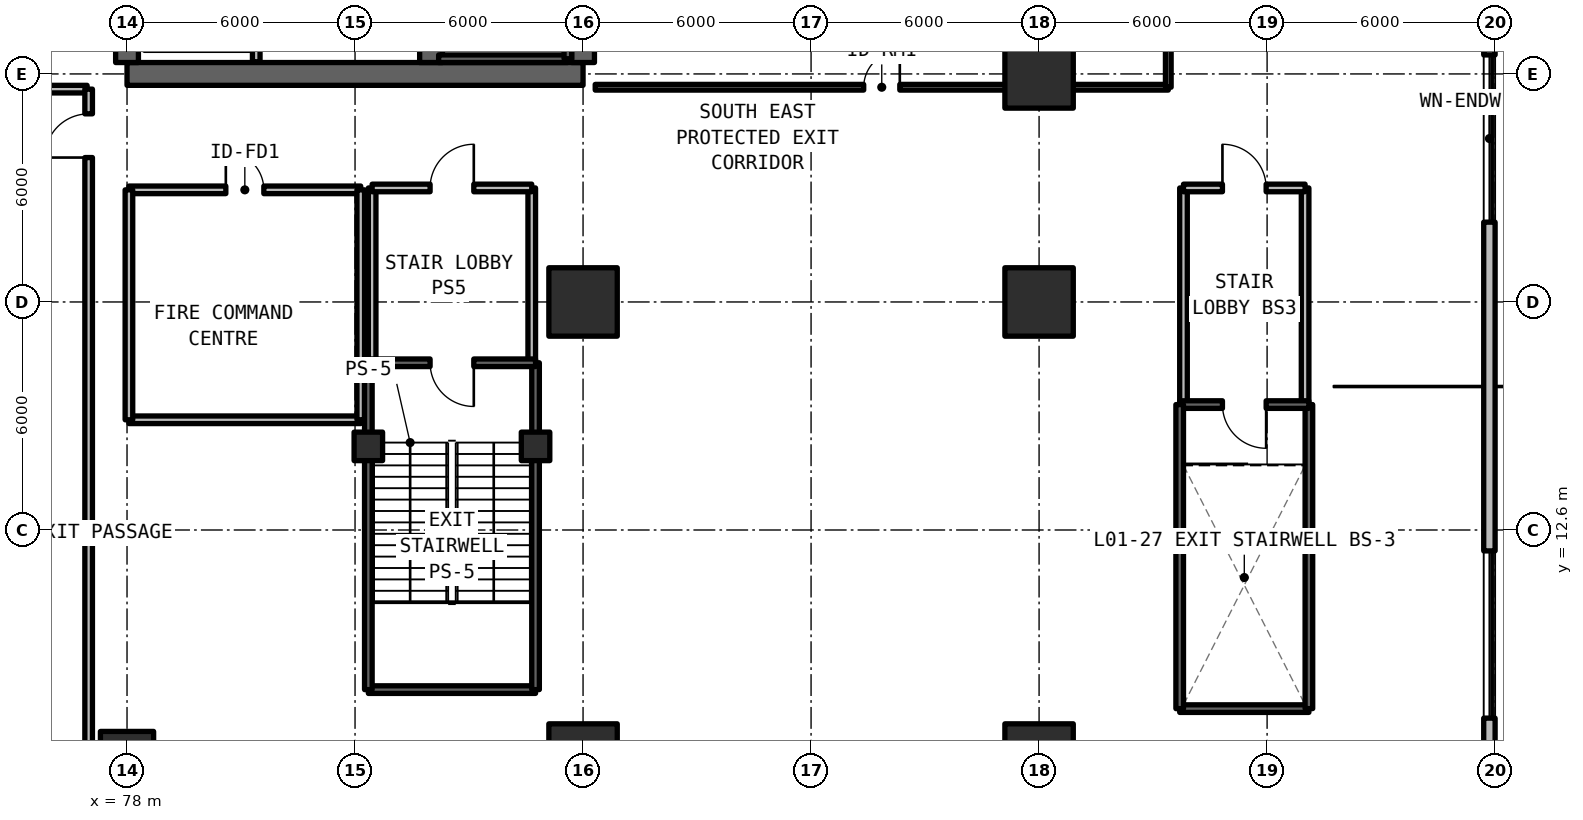
"""IFC4 building model, lengths in metres.
Left out: names, types, materials, properties, quantities, classifications, styles, units other than length and angle.
Written with IfcOpenShell. Run it as: python <this file> out.ifc"""

import sys

from ifc_helpers import new_model, si_unit, direction, frame, frame_2d, origin, origin_2d, place, context, subcontext, project, spatial, rectangle, circle, extrude, element, fill, save


model = new_model("IFC4")
c1 = context("Model", 3, precision=1e-05, world=origin(), true_north=direction((0.0, 1.0)))
c2 = subcontext(c1, "Body", "Model", "MODEL_VIEW")
j1 = project(units=[si_unit("LENGTHUNIT", "METRE"), si_unit("PLANEANGLEUNIT", "RADIAN")], contexts=[c1])
p1 = place(None, origin())
s1 = spatial("IfcSite", under=j1, at=p1, CompositionType="ELEMENT")
p2 = place(p1, origin())
s2 = spatial("IfcBuilding", under=s1, at=p2, CompositionType="ELEMENT")
p3 = place(p2, origin())
s3 = spatial("IfcBuildingStorey", under=s2, at=p3, CompositionType="ELEMENT", Elevation=0.0)
p4 = place(p3, frame((78.0, 24.6, 0.0), z_axis=(0.0, 0.0, 1.0), x_axis=(1.0, 0.0, 0.0)))
e1 = element("IfcWall", 1, at=p4, inside=s3, PredefinedType="SHEAR", context=c2, shape_type="SweptSolid", body=[
    extrude(rectangle(XDim=12.0, YDim=0.6, at=frame_2d((6.0, 0.0))), origin(), (0.0, 0.0, 1.0), 4.95),
])
p5 = place(p3, frame((90.0, 24.9, 0.0), z_axis=(0.0, 0.0, 1.0), x_axis=(0.0, 1.0, 0.0)))
e2 = element("IfcWall", 2, at=p5, inside=s3, PredefinedType="SHEAR", context=c2, shape_type="SweptSolid", body=[
    extrude(rectangle(XDim=17.4, YDim=0.6, at=frame_2d((8.7, 0.0))), origin(), (0.0, 0.0, 1.0), 4.95),
])
p6 = place(p3, frame((78.0, 24.9, 0.0), z_axis=(0.0, 0.0, 1.0), x_axis=(0.0, 1.0, 0.0)))
e3 = element("IfcWall", 3, at=p6, inside=s3, PredefinedType="SHEAR", context=c2, shape_type="SweptSolid", body=[
    extrude(rectangle(XDim=8.9, YDim=0.6, at=frame_2d((4.45, 0.0))), origin(), (0.0, 0.0, 1.0), 4.95),
])
p7 = place(p3, frame((86.0, 24.9, 0.0), z_axis=(0.0, 0.0, 1.0), x_axis=(0.0, 1.0, 0.0)))
e4 = element("IfcWall", 4, at=p7, inside=s3, PredefinedType="SHEAR", context=c2, shape_type="SweptSolid", body=[
    extrude(rectangle(XDim=17.4, YDim=0.6, at=frame_2d((8.7, 0.0))), origin(), (0.0, 0.0, 1.0), 4.95),
])
p8 = place(p7, frame((0.35, 0.0, 0.0)))
e5 = element("IfcOpeningElement", 5, at=p8, cuts=e4, PredefinedType="OPENING", context=c2, shape_type="SweptSolid", body=[
    extrude(rectangle(XDim=1.15, YDim=2.15, at=frame_2d((0.575, 1.075))), frame((0.0, 0.31, 0.0), z_axis=(0.0, -1.0, 0.0), x_axis=(1.0, 0.0, 0.0)), (0.0, 0.0, 1.0), 0.62),
])
p9 = place(p7, frame((9.55, 0.0, 0.0)))
e6 = element("IfcOpeningElement", 6, at=p9, cuts=e4, PredefinedType="OPENING", context=c2, shape_type="SweptSolid", body=[
    extrude(rectangle(XDim=1.15, YDim=2.15, at=frame_2d((0.575, 1.075))), frame((0.0, 0.31, 0.0), z_axis=(0.0, -1.0, 0.0), x_axis=(1.0, 0.0, 0.0)), (0.0, 0.0, 1.0), 0.62),
])
p10 = place(p3, frame((78.0, 6.6, 0.0), z_axis=(0.0, 0.0, 1.0), x_axis=(1.0, 0.0, 0.0)))
e7 = element("IfcColumn", 7, at=p10, inside=s3, PredefinedType="COLUMN", context=c2, shape_type="SweptSolid", body=[
    extrude(circle(Radius=0.7, at=origin_2d()), origin(), (0.0, 0.0, 1.0), 4.95),
])
for number, where, z_axis, x_axis in (
    (8, (90.0, 6.6, 0.0), (0.0, 0.0, 1.0), (1.0, 0.0, 0.0)),
    (9, (102.0, 6.6, 0.0), (0.0, 0.0, 1.0), (1.0, 0.0, 0.0)),
    (10, (102.0, 24.6, 0.0), (0.0, 0.0, 1.0), (1.0, 0.0, 0.0)),
    (11, (90.0, 18.6, 0.0), (0.0, 0.0, 1.0), (1.0, 0.0, 0.0)),
    (12, (102.0, 18.6, 0.0), (0.0, 0.0, 1.0), (1.0, 0.0, 0.0)),
):
    element("IfcColumn", number, at=place(p3, frame(where, z_axis=z_axis, x_axis=x_axis)), inside=s3, PredefinedType="COLUMN", context=c2, shape_type="SweptSolid", body=[
        extrude(rectangle(XDim=1.8, YDim=1.8, at=origin_2d()), origin(), (0.0, 0.0, 1.0), 4.95),
    ])
for number, where, z_axis, x_axis in (
    (13, (84.35, 14.8, 0.0), (0.0, 0.0, 1.0), (1.0, 0.0, 0.0)),
    (14, (88.75, 14.8, 0.0), (0.0, 0.0, 1.0), (1.0, 0.0, 0.0)),
):
    element("IfcColumn", number, at=place(p3, frame(where, z_axis=z_axis, x_axis=x_axis)), inside=s3, PredefinedType="COLUMN", context=c2, shape_type="SweptSolid", body=[
        extrude(rectangle(XDim=0.75, YDim=0.75, at=origin_2d()), origin(), (0.0, 0.0, 1.0), 4.95),
    ])
p11 = place(p3, frame((113.85, 0.15, 0.0), z_axis=(0.0, 0.0, 1.0), x_axis=(0.0, 1.0, 0.0)))
e15 = element("IfcWall", 15, at=p11, inside=s3, PredefinedType="SOLIDWALL", context=c2, shape_type="SweptSolid", body=[
    extrude(rectangle(XDim=66.9, YDim=0.3, at=frame_2d((33.45, 0.0))), origin(), (0.0, 0.0, 1.0), 4.67),
])
p12 = place(p11, frame((20.55, 0.0, 0.78)))
e16 = element("IfcOpeningElement", 16, at=p12, cuts=e15, PredefinedType="OPENING", context=c2, shape_type="SweptSolid", body=[
    extrude(rectangle(XDim=4.4, YDim=1.66, at=frame_2d((2.2, 0.83))), frame((0.0, 0.16, 0.0), z_axis=(0.0, -1.0, 0.0), x_axis=(1.0, 0.0, 0.0)), (0.0, 0.0, 1.0), 0.32),
])
p13 = place(p11, frame((41.95, 0.0, 0.78)))
e17 = element("IfcOpeningElement", 17, at=p13, cuts=e15, PredefinedType="OPENING", context=c2, shape_type="SweptSolid", body=[
    extrude(rectangle(XDim=4.4, YDim=1.66, at=frame_2d((2.2, 0.83))), frame((0.0, 0.16, 0.0), z_axis=(0.0, -1.0, 0.0), x_axis=(1.0, 0.0, 0.0)), (0.0, 0.0, 1.0), 0.32),
])
p14 = place(p11, frame((7.5, 0.0, 0.78)))
e18 = element("IfcOpeningElement", 18, at=p14, cuts=e15, PredefinedType="OPENING", context=c2, shape_type="SweptSolid", body=[
    extrude(rectangle(XDim=4.4, YDim=1.66, at=frame_2d((2.2, 0.83))), frame((0.0, 0.16, 0.0), z_axis=(0.0, -1.0, 0.0), x_axis=(1.0, 0.0, 0.0)), (0.0, 0.0, 1.0), 0.32),
])
p15 = place(p11, frame((26.5, 0.0, 0.78)))
e19 = element("IfcOpeningElement", 19, at=p15, cuts=e15, PredefinedType="OPENING", context=c2, shape_type="SweptSolid", body=[
    extrude(rectangle(XDim=4.4, YDim=1.66, at=frame_2d((2.2, 0.83))), frame((0.0, 0.16, 0.0), z_axis=(0.0, -1.0, 0.0), x_axis=(1.0, 0.0, 0.0)), (0.0, 0.0, 1.0), 0.32),
])
p16 = place(p11, frame((36.0, 0.0, 0.78)))
e20 = element("IfcOpeningElement", 20, at=p16, cuts=e15, PredefinedType="OPENING", context=c2, shape_type="SweptSolid", body=[
    extrude(rectangle(XDim=4.4, YDim=1.66, at=frame_2d((2.2, 0.83))), frame((0.0, 0.16, 0.0), z_axis=(0.0, -1.0, 0.0), x_axis=(1.0, 0.0, 0.0)), (0.0, 0.0, 1.0), 0.32),
])
p17 = place(p11, frame((55.0, 0.0, 0.78)))
e21 = element("IfcOpeningElement", 21, at=p17, cuts=e15, PredefinedType="OPENING", context=c2, shape_type="SweptSolid", body=[
    extrude(rectangle(XDim=4.4, YDim=1.66, at=frame_2d((2.2, 0.83))), frame((0.0, 0.16, 0.0), z_axis=(0.0, -1.0, 0.0), x_axis=(1.0, 0.0, 0.0)), (0.0, 0.0, 1.0), 0.32),
])
p18 = place(p3, frame((81.4, 24.92, 0.0), z_axis=(0.0, 0.0, 1.0), x_axis=(0.0, 1.0, 0.0)))
e22 = element("IfcWall", 22, at=p18, inside=s3, PredefinedType="SOLIDWALL", context=c2, shape_type="SweptSolid", body=[
    extrude(rectangle(XDim=3.58, YDim=0.2, at=frame_2d((1.79, 0.0))), origin(), (0.0, 0.0, 1.0), 3.89),
])
p19 = place(p18, frame((1.3, 0.0, 0.0)))
e23 = element("IfcOpeningElement", 23, at=p19, cuts=e22, PredefinedType="OPENING", context=c2, shape_type="SweptSolid", body=[
    extrude(rectangle(XDim=1.1, YDim=2.2, at=frame_2d((0.55, 1.1))), frame((0.0, 0.11, 0.0), z_axis=(0.0, -1.0, 0.0), x_axis=(1.0, 0.0, 0.0)), (0.0, 0.0, 1.0), 0.22),
])
p20 = place(p3, frame((74.1, 24.2, 0.0), z_axis=(0.0, 0.0, 1.0), x_axis=(1.0, 0.0, 0.0)))
e24 = element("IfcWall", 24, at=p20, inside=s3, PredefinedType="SOLIDWALL", context=c2, shape_type="SweptSolid", body=[
    extrude(rectangle(XDim=2.85, YDim=0.2, at=frame_2d((1.425, 0.0))), origin(), (0.0, 0.0, 1.0), 3.89),
])
p21 = place(p20, frame((0.65, 0.0, 0.0)))
e25 = element("IfcOpeningElement", 25, at=p21, cuts=e24, PredefinedType="OPENING", context=c2, shape_type="SweptSolid", body=[
    extrude(rectangle(XDim=1.15, YDim=2.15, at=frame_2d((0.575, 1.075))), frame((0.0, 0.11, 0.0), z_axis=(0.0, -1.0, 0.0), x_axis=(1.0, 0.0, 0.0)), (0.0, 0.0, 1.0), 0.22),
])
for number, where, z_axis, x_axis in (
    (26, (84.45, 17.0, 0.0), (0.0, 0.0, 1.0), (0.0, 1.0, 0.0)),
    (27, (88.65, 17.0, 0.0), (0.0, 0.0, 1.0), (0.0, 1.0, 0.0)),
):
    element("IfcWall", number, at=place(p3, frame(where, z_axis=z_axis, x_axis=x_axis)), inside=s3, PredefinedType="SOLIDWALL", context=c2, shape_type="SweptSolid", body=[
        extrude(rectangle(XDim=4.6, YDim=0.2, at=frame_2d((2.3, 0.0))), origin(), (0.0, 0.0, 1.0), 3.89),
    ])
p22 = place(p3, frame((84.45, 21.6, 0.0), z_axis=(0.0, 0.0, 1.0), x_axis=(1.0, 0.0, 0.0)))
e28 = element("IfcWall", 28, at=p22, inside=s3, PredefinedType="SOLIDWALL", context=c2, shape_type="SweptSolid", body=[
    extrude(rectangle(XDim=4.2, YDim=0.2, at=frame_2d((2.1, 0.0))), origin(), (0.0, 0.0, 1.0), 3.89),
])
p23 = place(p22, frame((1.525, 0.0, 0.0)))
e29 = element("IfcOpeningElement", 29, at=p23, cuts=e28, PredefinedType="OPENING", context=c2, shape_type="SweptSolid", body=[
    extrude(rectangle(XDim=1.15, YDim=2.15, at=frame_2d((0.575, 1.075))), frame((0.0, 0.11, 0.0), z_axis=(0.0, -1.0, 0.0), x_axis=(1.0, 0.0, 0.0)), (0.0, 0.0, 1.0), 0.22),
])
for number, where, z_axis, x_axis in (
    (30, (105.8, 15.9, 0.0), (0.0, 0.0, 1.0), (0.0, 1.0, 0.0)),
    (31, (109.0, 15.9, 0.0), (0.0, 0.0, 1.0), (0.0, 1.0, 0.0)),
):
    element("IfcWall", number, at=place(p3, frame(where, z_axis=z_axis, x_axis=x_axis)), inside=s3, PredefinedType="SOLIDWALL", context=c2, shape_type="SweptSolid", body=[
        extrude(rectangle(XDim=5.7, YDim=0.2, at=frame_2d((2.85, 0.0))), origin(), (0.0, 0.0, 1.0), 3.89),
    ])
p24 = place(p3, frame((105.8, 21.6, 0.0), z_axis=(0.0, 0.0, 1.0), x_axis=(1.0, 0.0, 0.0)))
e32 = element("IfcWall", 32, at=p24, inside=s3, PredefinedType="SOLIDWALL", context=c2, shape_type="SweptSolid", body=[
    extrude(rectangle(XDim=3.2, YDim=0.2, at=frame_2d((1.6, 0.0))), origin(), (0.0, 0.0, 1.0), 3.89),
])
p25 = place(p24, frame((1.025, 0.0, 0.0)))
e33 = element("IfcOpeningElement", 33, at=p25, cuts=e32, PredefinedType="OPENING", context=c2, shape_type="SweptSolid", body=[
    extrude(rectangle(XDim=1.15, YDim=2.15, at=frame_2d((0.575, 1.075))), frame((0.0, 0.11, 0.0), z_axis=(0.0, -1.0, 0.0), x_axis=(1.0, 0.0, 0.0)), (0.0, 0.0, 1.0), 0.22),
])
p26 = place(p3, frame((76.99, 0.3, 0.0), z_axis=(0.0, 0.0, 1.0), x_axis=(0.0, 1.0, 0.0)))
e34 = element("IfcWall", 34, at=p26, inside=s3, PredefinedType="SOLIDWALL", context=c2, shape_type="SweptSolid", body=[
    extrude(rectangle(XDim=23.9, YDim=0.2, at=frame_2d((11.95, 0.0))), origin(), (0.0, 0.0, 1.0), 3.89),
])
p27 = place(p26, frame((22.1, 0.0, 0.0)))
e35 = element("IfcOpeningElement", 35, at=p27, cuts=e34, PredefinedType="OPENING", context=c2, shape_type="SweptSolid", body=[
    extrude(rectangle(XDim=1.15, YDim=2.15, at=frame_2d((0.575, 1.075))), frame((0.0, 0.11, 0.0), z_axis=(0.0, -1.0, 0.0), x_axis=(1.0, 0.0, 0.0)), (0.0, 0.0, 1.0), 0.22),
])
p28 = place(p3, frame((78.05, 15.5, 0.0), z_axis=(0.0, 0.0, 1.0), x_axis=(1.0, 0.0, 0.0)))
e36 = element("IfcWall", 36, at=p28, inside=s3, PredefinedType="SOLIDWALL", context=c2, shape_type="SweptSolid", body=[
    extrude(rectangle(XDim=6.1, YDim=0.2, at=frame_2d((3.05, 0.0))), origin(), (0.0, 0.0, 1.0), 3.89),
])
p29 = place(p3, frame((78.05, 21.55, 0.0), z_axis=(0.0, 0.0, 1.0), x_axis=(1.0, 0.0, 0.0)))
e37 = element("IfcWall", 37, at=p29, inside=s3, PredefinedType="SOLIDWALL", context=c2, shape_type="SweptSolid", body=[
    extrude(rectangle(XDim=6.1, YDim=0.2, at=frame_2d((3.05, 0.0))), origin(), (0.0, 0.0, 1.0), 3.89),
])
p30 = place(p29, frame((2.55, 0.0, 0.0)))
e38 = element("IfcOpeningElement", 38, at=p30, cuts=e37, PredefinedType="OPENING", context=c2, shape_type="SweptSolid", body=[
    extrude(rectangle(XDim=1.0, YDim=2.15, at=frame_2d((0.5, 1.075))), frame((0.0, 0.11, 0.0), z_axis=(0.0, -1.0, 0.0), x_axis=(1.0, 0.0, 0.0)), (0.0, 0.0, 1.0), 0.22),
])
p31 = place(p3, frame((78.05, 15.5, 0.0), z_axis=(0.0, 0.0, 1.0), x_axis=(0.0, 1.0, 0.0)))
e39 = element("IfcWall", 39, at=p31, inside=s3, PredefinedType="SOLIDWALL", context=c2, shape_type="SweptSolid", body=[
    extrude(rectangle(XDim=6.05, YDim=0.2, at=frame_2d((3.025, 0.0))), origin(), (0.0, 0.0, 1.0), 3.885),
])
p32 = place(p3, frame((84.15, 15.5, 0.0), z_axis=(0.0, 0.0, 1.0), x_axis=(0.0, 1.0, 0.0)))
e40 = element("IfcWall", 40, at=p32, inside=s3, PredefinedType="SOLIDWALL", context=c2, shape_type="SweptSolid", body=[
    extrude(rectangle(XDim=6.05, YDim=0.2, at=frame_2d((3.025, 0.0))), origin(), (0.0, 0.0, 1.0), 3.89),
])
p33 = place(p3, frame((90.32, 24.25, 0.0), z_axis=(0.0, 0.0, 1.0), x_axis=(1.0, 0.0, 0.0)))
e41 = element("IfcWall", 41, at=p33, inside=s3, PredefinedType="SOLIDWALL", context=c2, shape_type="SweptSolid", body=[
    extrude(rectangle(XDim=15.08, YDim=0.15, at=frame_2d((7.54, 0.0))), origin(), (0.0, 0.0, 1.0), 3.89),
])
p34 = place(p33, frame((7.065, 0.0, 0.0)))
e42 = element("IfcOpeningElement", 42, at=p34, cuts=e41, PredefinedType="OPENING", context=c2, shape_type="SweptSolid", body=[
    extrude(rectangle(XDim=0.95, YDim=2.15, at=frame_2d((0.475, 1.075))), frame((0.0, 0.085, 0.0), z_axis=(0.0, -1.0, 0.0), x_axis=(1.0, 0.0, 0.0)), (0.0, 0.0, 1.0), 0.17),
])
p35 = place(p3, frame((105.4, 24.25, 0.0), z_axis=(0.0, 0.0, 1.0), x_axis=(0.0, 1.0, 0.0)))
e43 = element("IfcWall", 43, at=p35, inside=s3, PredefinedType="SOLIDWALL", context=c2, shape_type="SweptSolid", body=[
    extrude(rectangle(XDim=18.7, YDim=0.15, at=frame_2d((9.35, 0.0))), origin(), (0.0, 0.0, 1.0), 3.89),
])
p36 = place(p3, frame((86.2, 25.0, 0.0), z_axis=(0.0, 0.0, 1.0), x_axis=(1.0, 0.0, 0.0)))
e44 = element("IfcWall", 44, at=p36, inside=s3, PredefinedType="SOLIDWALL", context=c2, shape_type="SweptSolid", body=[
    extrude(rectangle(XDim=3.4, YDim=0.2, at=frame_2d((1.7, 0.0))), origin(), (0.0, 0.0, 1.0), 4.95),
])
p37 = place(p3, frame((89.6, 25.0, 0.0), z_axis=(0.0, 0.0, 1.0), x_axis=(0.0, 1.0, 0.0)))
e45 = element("IfcWall", 45, at=p37, inside=s3, PredefinedType="SOLIDWALL", context=c2, shape_type="SweptSolid", body=[
    extrude(rectangle(XDim=8.0, YDim=0.2, at=frame_2d((4.0, 0.0))), origin(), (0.0, 0.0, 1.0), 4.95),
])
p38 = place(p3, frame((84.35, 8.4, 0.0), z_axis=(0.0, 0.0, 1.0), x_axis=(1.0, 0.0, 0.0)))
e46 = element("IfcWall", 46, at=p38, inside=s3, PredefinedType="SOLIDWALL", context=c2, shape_type="SweptSolid", body=[
    extrude(rectangle(XDim=4.4, YDim=0.2, at=frame_2d((2.2, 0.0))), origin(), (0.0, 0.0, 1.0), 4.95),
])
p39 = place(p3, frame((88.75, 8.4, 0.0), z_axis=(0.0, 0.0, 1.0), x_axis=(0.0, 1.0, 0.0)))
e47 = element("IfcWall", 47, at=p39, inside=s3, PredefinedType="SOLIDWALL", context=c2, shape_type="SweptSolid", body=[
    extrude(rectangle(XDim=8.6, YDim=0.2, at=frame_2d((4.3, 0.0))), origin(), (0.0, 0.0, 1.0), 4.95),
])
p40 = place(p3, frame((88.75, 17.0, 0.0), z_axis=(0.0, 0.0, 1.0), x_axis=(-1.0, 0.0, 0.0)))
e48 = element("IfcWall", 48, at=p40, inside=s3, PredefinedType="SOLIDWALL", context=c2, shape_type="SweptSolid", body=[
    extrude(rectangle(XDim=4.4, YDim=0.2, at=frame_2d((2.2, 0.0))), origin(), (0.0, 0.0, 1.0), 4.95),
])
p41 = place(p40, frame((1.625, 0.0, 0.0)))
e49 = element("IfcOpeningElement", 49, at=p41, cuts=e48, PredefinedType="OPENING", context=c2, shape_type="SweptSolid", body=[
    extrude(rectangle(XDim=1.15, YDim=2.15, at=frame_2d((0.575, 1.075))), frame((0.0, 0.11, 0.0), z_axis=(0.0, -1.0, 0.0), x_axis=(1.0, 0.0, 0.0)), (0.0, 0.0, 1.0), 0.22),
])
p42 = place(p3, frame((84.35, 17.0, 0.0), z_axis=(0.0, 0.0, 1.0), x_axis=(0.0, -1.0, 0.0)))
e50 = element("IfcWall", 50, at=p42, inside=s3, PredefinedType="SOLIDWALL", context=c2, shape_type="SweptSolid", body=[
    extrude(rectangle(XDim=8.6, YDim=0.2, at=frame_2d((4.3, 0.0))), origin(), (0.0, 0.0, 1.0), 4.95),
])
p43 = place(p3, frame((105.7, 7.9, 0.0), z_axis=(0.0, 0.0, 1.0), x_axis=(1.0, 0.0, 0.0)))
e51 = element("IfcWall", 51, at=p43, inside=s3, PredefinedType="SOLIDWALL", context=c2, shape_type="SweptSolid", body=[
    extrude(rectangle(XDim=3.4, YDim=0.2, at=frame_2d((1.7, 0.0))), origin(), (0.0, 0.0, 1.0), 4.95),
])
p44 = place(p3, frame((109.1, 7.9, 0.0), z_axis=(0.0, 0.0, 1.0), x_axis=(0.0, 1.0, 0.0)))
e52 = element("IfcWall", 52, at=p44, inside=s3, PredefinedType="SOLIDWALL", context=c2, shape_type="SweptSolid", body=[
    extrude(rectangle(XDim=8.0, YDim=0.2, at=frame_2d((4.0, 0.0))), origin(), (0.0, 0.0, 1.0), 4.95),
])
p45 = place(p3, frame((109.1, 15.9, 0.0), z_axis=(0.0, 0.0, 1.0), x_axis=(-1.0, 0.0, 0.0)))
e53 = element("IfcWall", 53, at=p45, inside=s3, PredefinedType="SOLIDWALL", context=c2, shape_type="SweptSolid", body=[
    extrude(rectangle(XDim=3.4, YDim=0.2, at=frame_2d((1.7, 0.0))), origin(), (0.0, 0.0, 1.0), 4.95),
])
p46 = place(p45, frame((1.125, 0.0, 0.0)))
e54 = element("IfcOpeningElement", 54, at=p46, cuts=e53, PredefinedType="OPENING", context=c2, shape_type="SweptSolid", body=[
    extrude(rectangle(XDim=1.15, YDim=2.15, at=frame_2d((0.575, 1.075))), frame((0.0, 0.11, 0.0), z_axis=(0.0, -1.0, 0.0), x_axis=(1.0, 0.0, 0.0)), (0.0, 0.0, 1.0), 0.22),
])
p47 = place(p3, frame((105.7, 15.9, 0.0), z_axis=(0.0, 0.0, 1.0), x_axis=(0.0, -1.0, 0.0)))
e55 = element("IfcWall", 55, at=p47, inside=s3, PredefinedType="SOLIDWALL", context=c2, shape_type="SweptSolid", body=[
    extrude(rectangle(XDim=8.0, YDim=0.2, at=frame_2d((4.0, 0.0))), origin(), (0.0, 0.0, 1.0), 4.95),
])
p48 = place(p12, origin())
e56 = element("IfcWindow", 56, at=p48, inside=s3, PartitioningType="SINGLE_PANEL", PredefinedType="WINDOW", context=c2, shape_type="SweptSolid", body=[
    extrude(rectangle(XDim=4.4, YDim=1.66, at=frame_2d((2.2, 0.83))), frame((0.0, 0.03, 0.0), z_axis=(0.0, -1.0, 0.0), x_axis=(1.0, 0.0, 0.0)), (0.0, 0.0, 1.0), 0.06),
])
fill(e16, e56)
p49 = place(p14, origin())
e57 = element("IfcWindow", 57, at=p49, inside=s3, PartitioningType="SINGLE_PANEL", PredefinedType="WINDOW", context=c2, shape_type="SweptSolid", body=[
    extrude(rectangle(XDim=4.4, YDim=1.66, at=frame_2d((2.2, 0.83))), frame((0.0, 0.03, 0.0), z_axis=(0.0, -1.0, 0.0), x_axis=(1.0, 0.0, 0.0)), (0.0, 0.0, 1.0), 0.06),
])
fill(e18, e57)
p50 = place(p23, origin())
e58 = element("IfcDoor", 58, at=p50, inside=s3, OperationType="SINGLE_SWING_RIGHT", PredefinedType="DOOR", context=c2, shape_type="SweptSolid", body=[
    extrude(rectangle(XDim=1.15, YDim=2.15, at=frame_2d((0.575, 1.075))), frame((0.0, 0.025, 0.0), z_axis=(0.0, -1.0, 0.0), x_axis=(1.0, 0.0, 0.0)), (0.0, 0.0, 1.0), 0.05),
])
fill(e29, e58)
p51 = place(p25, origin())
e59 = element("IfcDoor", 59, at=p51, inside=s3, OperationType="SINGLE_SWING_LEFT", PredefinedType="DOOR", context=c2, shape_type="SweptSolid", body=[
    extrude(rectangle(XDim=1.15, YDim=2.15, at=frame_2d((0.575, 1.075))), frame((0.0, 0.025, 0.0), z_axis=(0.0, -1.0, 0.0), x_axis=(1.0, 0.0, 0.0)), (0.0, 0.0, 1.0), 0.05),
])
fill(e33, e59)
p52 = place(p27, origin())
e60 = element("IfcDoor", 60, at=p52, inside=s3, OperationType="SINGLE_SWING_LEFT", PredefinedType="DOOR", context=c2, shape_type="SweptSolid", body=[
    extrude(rectangle(XDim=1.15, YDim=2.15, at=frame_2d((0.575, 1.075))), frame((0.0, 0.025, 0.0), z_axis=(0.0, -1.0, 0.0), x_axis=(1.0, 0.0, 0.0)), (0.0, 0.0, 1.0), 0.05),
])
fill(e35, e60)
p53 = place(p30, origin())
e61 = element("IfcDoor", 61, at=p53, inside=s3, OperationType="SINGLE_SWING_LEFT", PredefinedType="DOOR", context=c2, shape_type="SweptSolid", body=[
    extrude(rectangle(XDim=1.0, YDim=2.15, at=frame_2d((0.5, 1.075))), frame((0.0, 0.025, 0.0), z_axis=(0.0, -1.0, 0.0), x_axis=(1.0, 0.0, 0.0)), (0.0, 0.0, 1.0), 0.05),
])
fill(e38, e61)
p54 = place(p34, frame((0.95, 0.0, 0.0), z_axis=(0.0, 0.0, 1.0), x_axis=(-1.0, 0.0, 0.0)))
e62 = element("IfcDoor", 62, at=p54, inside=s3, OperationType="SINGLE_SWING_RIGHT", PredefinedType="DOOR", context=c2, shape_type="SweptSolid", body=[
    extrude(rectangle(XDim=0.95, YDim=2.15, at=frame_2d((0.475, 1.075))), frame((0.0, 0.025, 0.0), z_axis=(0.0, -1.0, 0.0), x_axis=(1.0, 0.0, 0.0)), (0.0, 0.0, 1.0), 0.05),
])
fill(e42, e62)
p55 = place(p41, frame((1.15, 0.0, 0.0), z_axis=(0.0, 0.0, 1.0), x_axis=(-1.0, 0.0, 0.0)))
e63 = element("IfcDoor", 63, at=p55, inside=s3, OperationType="SINGLE_SWING_LEFT", PredefinedType="DOOR", context=c2, shape_type="SweptSolid", body=[
    extrude(rectangle(XDim=1.15, YDim=2.15, at=frame_2d((0.575, 1.075))), frame((0.0, 0.025, 0.0), z_axis=(0.0, -1.0, 0.0), x_axis=(1.0, 0.0, 0.0)), (0.0, 0.0, 1.0), 0.05),
])
fill(e49, e63)
p56 = place(p46, frame((1.15, 0.0, 0.0), z_axis=(0.0, 0.0, 1.0), x_axis=(-1.0, 0.0, 0.0)))
e64 = element("IfcDoor", 64, at=p56, inside=s3, OperationType="SINGLE_SWING_LEFT", PredefinedType="DOOR", context=c2, shape_type="SweptSolid", body=[
    extrude(rectangle(XDim=1.15, YDim=2.15, at=frame_2d((0.575, 1.075))), frame((0.0, 0.025, 0.0), z_axis=(0.0, -1.0, 0.0), x_axis=(1.0, 0.0, 0.0)), (0.0, 0.0, 1.0), 0.05),
])
fill(e54, e64)
save(model, sys.argv[1])
